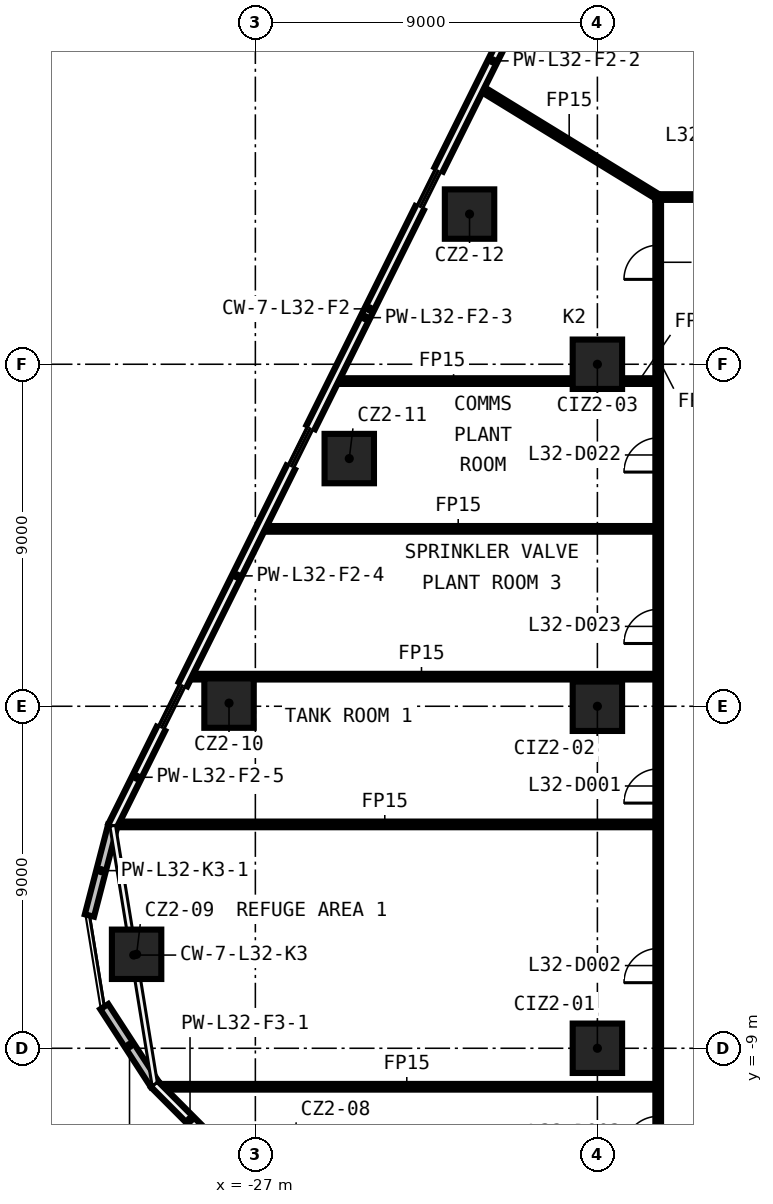
"""IFC4 building model, lengths in metres.
Left out: names, types, materials, properties, quantities, classifications, styles, units other than length and angle.
Written with IfcOpenShell. Run it as: python <this file> out.ifc"""

import sys

from ifc_helpers import new_model, si_unit, direction, frame, frame_2d, origin, origin_2d, place, context, subcontext, project, spatial, rectangle, extrude, element, fill, save


model = new_model("IFC4")
c1 = context("Model", 3, precision=1e-05, world=origin(), true_north=direction((0.0, 1.0)))
c2 = subcontext(c1, "Body", "Model", "MODEL_VIEW")
j1 = project(units=[si_unit("LENGTHUNIT", "METRE"), si_unit("PLANEANGLEUNIT", "RADIAN")], contexts=[c1])
p1 = place(None, origin())
s1 = spatial("IfcSite", under=j1, at=p1, CompositionType="ELEMENT")
p2 = place(p1, origin())
s2 = spatial("IfcBuilding", under=s1, at=p2, CompositionType="ELEMENT")
p3 = place(p2, frame((0.0, 0.0, 145.6)))
s3 = spatial("IfcBuildingStorey", under=s2, at=p3, CompositionType="ELEMENT", Elevation=145.6)
for number, where, z_axis, x_axis in (
    (1, (-30.125, -6.527, 0.0), (0.0, 0.0, 1.0), (1.0, 0.0, 0.0)),
    (2, (-27.693, 0.083, 0.0), (0.0, 0.0, 1.0), (1.0, 0.0, 0.0)),
    (3, (-24.529, 6.518, 0.0), (0.0, 0.0, 1.0), (1.0, 0.0, 0.0)),
    (4, (-21.364, 12.952, 0.0), (0.0, 0.0, 1.0), (1.0, 0.0, 0.0)),
    (5, (-18.0, -9.0, 0.0), (0.0, 0.0, 1.0), (1.0, 0.0, 0.0)),
    (6, (-18.0, 0.0, 0.0), (0.0, 0.0, 1.0), (1.0, 0.0, 0.0)),
    (7, (-18.0, 9.0, 0.0), (0.0, 0.0, 1.0), (1.0, 0.0, 0.0)),
):
    element("IfcColumn", number, at=place(p3, frame(where, z_axis=z_axis, x_axis=x_axis)), inside=s3, PredefinedType="COLUMN", context=c2, shape_type="SweptSolid", body=[
        extrude(rectangle(XDim=1.3, YDim=1.3, at=origin_2d()), origin(), (0.0, 0.0, 1.0), 5.55),
    ])
p4 = place(p3, frame((-29.556, -10.013, 0.0), z_axis=(0.0, 0.0, 1.0), x_axis=(1.0, 0.0, 0.0)))
e8 = element("IfcWall", 8, at=p4, inside=s3, PredefinedType="PARTITIONING", context=c2, shape_type="SweptSolid", body=[
    extrude(rectangle(XDim=13.081, YDim=0.15, at=frame_2d((6.541, 0.0))), origin(), (0.0, 0.0, 1.0), 5.55),
])
p5 = place(p3, frame((-30.714, -3.109, 0.0), z_axis=(0.0, 0.0, 1.0), x_axis=(1.0, 0.0, 0.0)))
e9 = element("IfcWall", 9, at=p5, inside=s3, PredefinedType="PARTITIONING", context=c2, shape_type="SweptSolid", body=[
    extrude(rectangle(XDim=14.239, YDim=0.15, at=frame_2d((7.119, 0.0))), origin(), (0.0, 0.0, 1.0), 5.55),
])
p6 = place(p3, frame((-28.782, 0.779, 0.0), z_axis=(0.0, 0.0, 1.0), x_axis=(1.0, 0.0, 0.0)))
e10 = element("IfcWall", 10, at=p6, inside=s3, PredefinedType="PARTITIONING", context=c2, shape_type="SweptSolid", body=[
    extrude(rectangle(XDim=12.307, YDim=0.15, at=frame_2d((6.153, 0.0))), origin(), (0.0, 0.0, 1.0), 5.55),
])
p7 = place(p3, frame((-26.85, 4.668, 0.0), z_axis=(0.0, 0.0, 1.0), x_axis=(1.0, 0.0, 0.0)))
e11 = element("IfcWall", 11, at=p7, inside=s3, PredefinedType="PARTITIONING", context=c2, shape_type="SweptSolid", body=[
    extrude(rectangle(XDim=10.375, YDim=0.15, at=frame_2d((5.187, 0.0))), origin(), (0.0, 0.0, 1.0), 5.55),
])
p8 = place(p3, frame((-24.918, 8.557, 0.0), z_axis=(0.0, 0.0, 1.0), x_axis=(1.0, 0.0, 0.0)))
e12 = element("IfcWall", 12, at=p8, inside=s3, PredefinedType="PARTITIONING", context=c2, shape_type="SweptSolid", body=[
    extrude(rectangle(XDim=6.268, YDim=0.15, at=frame_2d((3.134, 0.0))), origin(), (0.0, 0.0, 1.0), 5.55),
])
p9 = place(p3, frame((-17.35, 8.557, 0.0), z_axis=(0.0, 0.0, 1.0), x_axis=(1.0, 0.0, 0.0)))
e13 = element("IfcWall", 13, at=p9, inside=s3, PredefinedType="PARTITIONING", context=c2, shape_type="SweptSolid", body=[
    extrude(rectangle(XDim=0.875, YDim=0.15, at=frame_2d((0.438, 0.0))), origin(), (0.0, 0.0, 1.0), 5.55),
])
p10 = place(p3, frame((-16.475, 13.4, 0.0), z_axis=(0.0, 0.0, 1.0), x_axis=(1.0, 0.0, 0.0)))
e14 = element("IfcWall", 14, at=p10, inside=s3, PredefinedType="PARTITIONING", context=c2, shape_type="SweptSolid", body=[
    extrude(rectangle(XDim=32.95, YDim=0.15, at=frame_2d((16.475, 0.0))), origin(), (0.0, 0.0, 1.0), 5.55),
])
p11 = place(p10, frame((30.036, 0.0, 0.0)))
e15 = element("IfcOpeningElement", 15, at=p11, cuts=e14, PredefinedType="OPENING", context=c2, shape_type="SweptSolid", body=[
    extrude(rectangle(XDim=0.9, YDim=2.1, at=frame_2d((0.45, 1.05))), frame((0.0, 0.085, 0.0), z_axis=(0.0, -1.0, 0.0), x_axis=(1.0, 0.0, 0.0)), (0.0, 0.0, 1.0), 0.17),
])
p12 = place(p10, frame((23.129, 0.0, 0.0)))
e16 = element("IfcOpeningElement", 16, at=p12, cuts=e14, PredefinedType="OPENING", context=c2, shape_type="SweptSolid", body=[
    extrude(rectangle(XDim=0.9, YDim=2.1, at=frame_2d((0.45, 1.05))), frame((0.0, 0.085, 0.0), z_axis=(0.0, -1.0, 0.0), x_axis=(1.0, 0.0, 0.0)), (0.0, 0.0, 1.0), 0.17),
])
p13 = place(p10, frame((17.059, 0.0, 0.0)))
e17 = element("IfcOpeningElement", 17, at=p13, cuts=e14, PredefinedType="OPENING", context=c2, shape_type="SweptSolid", body=[
    extrude(rectangle(XDim=0.9, YDim=2.1, at=frame_2d((0.45, 1.05))), frame((0.0, 0.085, 0.0), z_axis=(0.0, -1.0, 0.0), x_axis=(1.0, 0.0, 0.0)), (0.0, 0.0, 1.0), 0.17),
])
p14 = place(p10, frame((9.529, 0.0, 0.0)))
e18 = element("IfcOpeningElement", 18, at=p14, cuts=e14, PredefinedType="OPENING", context=c2, shape_type="SweptSolid", body=[
    extrude(rectangle(XDim=0.9, YDim=2.1, at=frame_2d((0.45, 1.05))), frame((0.0, 0.085, 0.0), z_axis=(0.0, -1.0, 0.0), x_axis=(1.0, 0.0, 0.0)), (0.0, 0.0, 1.0), 0.17),
])
p15 = place(p10, frame((6.62, 0.0, 0.0)))
e19 = element("IfcOpeningElement", 19, at=p15, cuts=e14, PredefinedType="OPENING", context=c2, shape_type="SweptSolid", body=[
    extrude(rectangle(XDim=0.9, YDim=2.1, at=frame_2d((0.45, 1.05))), frame((0.0, 0.085, 0.0), z_axis=(0.0, -1.0, 0.0), x_axis=(1.0, 0.0, 0.0)), (0.0, 0.0, 1.0), 0.17),
])
p16 = place(p10, frame((1.031, 0.0, 0.0)))
e20 = element("IfcOpeningElement", 20, at=p16, cuts=e14, PredefinedType="OPENING", context=c2, shape_type="SweptSolid", body=[
    extrude(rectangle(XDim=0.9, YDim=2.1, at=frame_2d((0.45, 1.05))), frame((0.0, 0.085, 0.0), z_axis=(0.0, -1.0, 0.0), x_axis=(1.0, 0.0, 0.0)), (0.0, 0.0, 1.0), 0.17),
])
p17 = place(p3, frame((-16.4, -13.325, 0.0), z_axis=(0.0, 0.0, 1.0), x_axis=(0.0, 1.0, 0.0)))
e21 = element("IfcWall", 21, at=p17, inside=s3, PredefinedType="PARTITIONING", context=c2, shape_type="SweptSolid", body=[
    extrude(rectangle(XDim=26.65, YDim=0.15, at=frame_2d((13.325, 0.0))), origin(), (0.0, 0.0, 1.0), 5.55),
])
p18 = place(p17, frame((10.777, 0.0, 0.0)))
e22 = element("IfcOpeningElement", 22, at=p18, cuts=e21, PredefinedType="OPENING", context=c2, shape_type="SweptSolid", body=[
    extrude(rectangle(XDim=0.9, YDim=2.1, at=frame_2d((0.45, 1.05))), frame((0.0, 0.085, 0.0), z_axis=(0.0, -1.0, 0.0), x_axis=(1.0, 0.0, 0.0)), (0.0, 0.0, 1.0), 0.17),
])
p19 = place(p17, frame((6.051, 0.0, 0.0)))
e23 = element("IfcOpeningElement", 23, at=p19, cuts=e21, PredefinedType="OPENING", context=c2, shape_type="SweptSolid", body=[
    extrude(rectangle(XDim=0.9, YDim=2.1, at=frame_2d((0.45, 1.05))), frame((0.0, 0.085, 0.0), z_axis=(0.0, -1.0, 0.0), x_axis=(1.0, 0.0, 0.0)), (0.0, 0.0, 1.0), 0.17),
])
p20 = place(p17, frame((1.634, 0.0, 0.0)))
e24 = element("IfcOpeningElement", 24, at=p20, cuts=e21, PredefinedType="OPENING", context=c2, shape_type="SweptSolid", body=[
    extrude(rectangle(XDim=0.9, YDim=2.1, at=frame_2d((0.45, 1.05))), frame((0.0, 0.085, 0.0), z_axis=(0.0, -1.0, 0.0), x_axis=(1.0, 0.0, 0.0)), (0.0, 0.0, 1.0), 0.17),
])
p21 = place(p17, frame((24.559, 0.0, 0.0)))
e25 = element("IfcOpeningElement", 25, at=p21, cuts=e21, PredefinedType="OPENING", context=c2, shape_type="SweptSolid", body=[
    extrude(rectangle(XDim=0.9, YDim=2.1, at=frame_2d((0.45, 1.05))), frame((0.0, 0.085, 0.0), z_axis=(0.0, -1.0, 0.0), x_axis=(1.0, 0.0, 0.0)), (0.0, 0.0, 1.0), 0.17),
])
p22 = place(p17, frame((19.488, 0.0, 0.0)))
e26 = element("IfcOpeningElement", 26, at=p22, cuts=e21, PredefinedType="OPENING", context=c2, shape_type="SweptSolid", body=[
    extrude(rectangle(XDim=0.9, YDim=2.1, at=frame_2d((0.45, 1.05))), frame((0.0, 0.085, 0.0), z_axis=(0.0, -1.0, 0.0), x_axis=(1.0, 0.0, 0.0)), (0.0, 0.0, 1.0), 0.17),
])
p23 = place(p17, frame((14.977, 0.0, 0.0)))
e27 = element("IfcOpeningElement", 27, at=p23, cuts=e21, PredefinedType="OPENING", context=c2, shape_type="SweptSolid", body=[
    extrude(rectangle(XDim=0.9, YDim=2.1, at=frame_2d((0.45, 1.05))), frame((0.0, 0.085, 0.0), z_axis=(0.0, -1.0, 0.0), x_axis=(1.0, 0.0, 0.0)), (0.0, 0.0, 1.0), 0.17),
])
p24 = place(p3, frame((-21.085, 16.272, 0.0), z_axis=(0.0, 0.0, 1.0), x_axis=(0.85254186304, -0.52265894402, 0.0)))
e28 = element("IfcWall", 28, at=p24, inside=s3, PredefinedType="PARTITIONING", context=c2, shape_type="SweptSolid", body=[
    extrude(rectangle(XDim=5.495, YDim=0.15, at=frame_2d((2.748, 0.0))), origin(), (0.0, 0.0, 1.0), 5.55),
])
p25 = place(p3, frame((-19.334, 19.842, 0.0), z_axis=(0.0, 0.0, 1.0), x_axis=(-0.444917158653, -0.895571729085, 0.0)))
e29 = element("IfcWall", 29, at=p25, inside=s3, PredefinedType="SOLIDWALL", context=c2, shape_type="SweptSolid", body=[
    extrude(rectangle(XDim=6.383, YDim=0.25, at=frame_2d((3.191, 0.0))), origin(), (0.0, 0.0, 1.0), 5.55),
])
p26 = place(p3, frame((-22.679, 13.108, 0.0), z_axis=(0.0, 0.0, 1.0), x_axis=(-0.444935872318, -0.895562431952, 0.0)))
e30 = element("IfcWall", 30, at=p26, inside=s3, PredefinedType="SOLIDWALL", context=c2, shape_type="SweptSolid", body=[
    extrude(rectangle(XDim=6.435, YDim=0.25, at=frame_2d((3.218, 0.0))), origin(), (0.0, 0.0, 1.0), 5.55),
])
p27 = place(p3, frame((-26.07, 6.282, 0.0), z_axis=(0.0, 0.0, 1.0), x_axis=(-0.444896166975, -0.895582157376, 0.0)))
e31 = element("IfcWall", 31, at=p27, inside=s3, PredefinedType="SOLIDWALL", context=c2, shape_type="SweptSolid", body=[
    extrude(rectangle(XDim=6.367, YDim=0.25, at=frame_2d((3.184, 0.0))), origin(), (0.0, 0.0, 1.0), 5.55),
])
p28 = place(p3, frame((-29.486, -0.593, 0.0), z_axis=(0.0, 0.0, 1.0), x_axis=(-0.444950142646, -0.895555341986, 0.0)))
e32 = element("IfcWall", 32, at=p28, inside=s3, PredefinedType="SOLIDWALL", context=c2, shape_type="SweptSolid", body=[
    extrude(rectangle(XDim=2.849, YDim=0.25, at=frame_2d((1.425, 0.0))), origin(), (0.0, 0.0, 1.0), 5.55),
])
for number, where, z_axis, x_axis in (
    (33, (-30.754, -3.145, 0.0), (0.0, 0.0, 1.0), (-0.251, -0.968, 0.0)),
    (34, (-30.976, -7.904, 0.0), (0.0, 0.0, 1.0), (0.545, -0.839, 0.0)),
):
    element("IfcWall", number, at=place(p3, frame(where, z_axis=z_axis, x_axis=x_axis)), inside=s3, PredefinedType="SOLIDWALL", context=c2, shape_type="SweptSolid", body=[
        extrude(rectangle(XDim=2.44, YDim=0.25, at=frame_2d((1.22, 0.0))), origin(), (0.0, 0.0, 1.0), 5.55),
    ])
p29 = place(p3, frame((-29.647, -9.95, 0.0), z_axis=(0.0, 0.0, 1.0), x_axis=(0.70571255564, -0.708498263097, 0.0)))
e35 = element("IfcWall", 35, at=p29, inside=s3, PredefinedType="SOLIDWALL", context=c2, shape_type="SweptSolid", body=[
    extrude(rectangle(XDim=2.629, YDim=0.25, at=frame_2d((1.314, 0.0))), origin(), (0.0, 0.0, 1.0), 5.55),
])
p30 = place(p18, origin())
e36 = element("IfcDoor", 36, at=p30, inside=s3, OperationType="SINGLE_SWING_RIGHT", PredefinedType="DOOR", context=c2, shape_type="SweptSolid", body=[
    extrude(rectangle(XDim=0.9, YDim=2.1, at=frame_2d((0.45, 1.05))), frame((0.0, 0.025, 0.0), z_axis=(0.0, -1.0, 0.0), x_axis=(1.0, 0.0, 0.0)), (0.0, 0.0, 1.0), 0.05),
])
fill(e22, e36)
p31 = place(p19, origin())
e37 = element("IfcDoor", 37, at=p31, inside=s3, OperationType="SINGLE_SWING_LEFT", PredefinedType="DOOR", context=c2, shape_type="SweptSolid", body=[
    extrude(rectangle(XDim=0.9, YDim=2.1, at=frame_2d((0.45, 1.05))), frame((0.0, 0.025, 0.0), z_axis=(0.0, -1.0, 0.0), x_axis=(1.0, 0.0, 0.0)), (0.0, 0.0, 1.0), 0.05),
])
fill(e23, e37)
p32 = place(p20, origin())
e38 = element("IfcDoor", 38, at=p32, inside=s3, OperationType="SINGLE_SWING_RIGHT", PredefinedType="DOOR", context=c2, shape_type="SweptSolid", body=[
    extrude(rectangle(XDim=0.9, YDim=2.1, at=frame_2d((0.45, 1.05))), frame((0.0, 0.025, 0.0), z_axis=(0.0, -1.0, 0.0), x_axis=(1.0, 0.0, 0.0)), (0.0, 0.0, 1.0), 0.05),
])
fill(e24, e38)
p33 = place(p21, origin())
e39 = element("IfcDoor", 39, at=p33, inside=s3, OperationType="SINGLE_SWING_RIGHT", PredefinedType="DOOR", context=c2, shape_type="SweptSolid", body=[
    extrude(rectangle(XDim=0.9, YDim=2.1, at=frame_2d((0.45, 1.05))), frame((0.0, 0.025, 0.0), z_axis=(0.0, -1.0, 0.0), x_axis=(1.0, 0.0, 0.0)), (0.0, 0.0, 1.0), 0.05),
])
fill(e25, e39)
p34 = place(p22, origin())
e40 = element("IfcDoor", 40, at=p34, inside=s3, OperationType="SINGLE_SWING_LEFT", PredefinedType="DOOR", context=c2, shape_type="SweptSolid", body=[
    extrude(rectangle(XDim=0.9, YDim=2.1, at=frame_2d((0.45, 1.05))), frame((0.0, 0.025, 0.0), z_axis=(0.0, -1.0, 0.0), x_axis=(1.0, 0.0, 0.0)), (0.0, 0.0, 1.0), 0.05),
])
fill(e26, e40)
p35 = place(p23, origin())
e41 = element("IfcDoor", 41, at=p35, inside=s3, OperationType="SINGLE_SWING_RIGHT", PredefinedType="DOOR", context=c2, shape_type="SweptSolid", body=[
    extrude(rectangle(XDim=0.9, YDim=2.1, at=frame_2d((0.45, 1.05))), frame((0.0, 0.025, 0.0), z_axis=(0.0, -1.0, 0.0), x_axis=(1.0, 0.0, 0.0)), (0.0, 0.0, 1.0), 0.05),
])
fill(e27, e41)
save(model, sys.argv[1])
